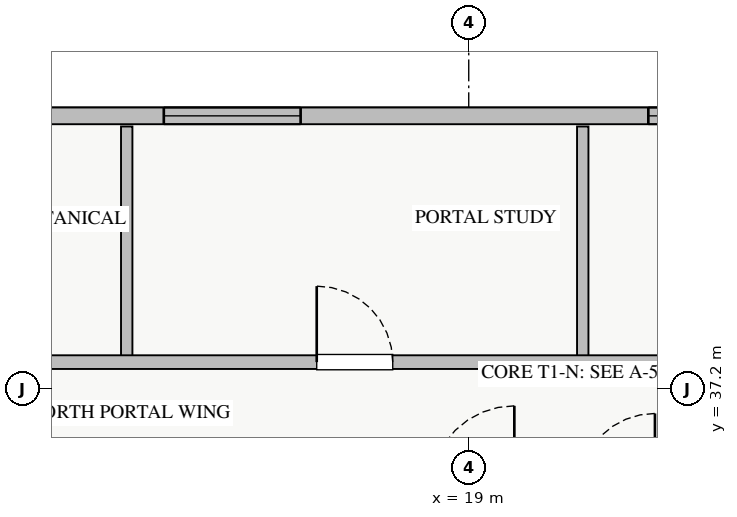
"""IFC4 building model, lengths in metres.
Left out: names, types, materials, properties, quantities, classifications, styles, units other than length and angle.
Written with IfcOpenShell. Run it as: python <this file> out.ifc"""

import sys

from ifc_helpers import new_model, si_unit, direction, frame, frame_2d, origin, place, context, subcontext, project, spatial, rectangle, extrude, source, transform, mapped, element, fill, save


model = new_model("IFC4")
c1 = context("Model", 3, precision=1e-05, world=origin(), true_north=direction((0.0, 1.0)))
c2 = subcontext(c1, "Body", "Model", "MODEL_VIEW")
j1 = project(units=[si_unit("LENGTHUNIT", "METRE"), si_unit("PLANEANGLEUNIT", "RADIAN")], contexts=[c1])
p1 = place(None, origin())
s1 = spatial("IfcSite", under=j1, at=p1, CompositionType="ELEMENT")
p2 = place(p1, origin())
s2 = spatial("IfcBuilding", under=s1, at=p2, CompositionType="ELEMENT")
p3 = place(p2, frame((0.0, 0.0, 169.75)))
s3 = spatial("IfcBuildingStorey", under=s2, at=p3, CompositionType="ELEMENT", Elevation=169.75)
p4 = place(p3, frame((6.55, 40.79, 0.0), z_axis=(0.0, 0.0, 1.0), x_axis=(1.0, 0.0, 0.0)))
e1 = element("IfcWall", 1, at=p4, inside=s3, PredefinedType="STANDARD", context=c2, shape_type="SweptSolid", body=[
    extrude(rectangle(XDim=24.9, YDim=0.22, at=frame_2d((12.45, 0.0))), origin(), (0.0, 0.0, 1.0), 2.54),
])
p5 = place(p4, frame((3.833, 0.0, 0.9)))
e2 = element("IfcOpeningElement", 2, at=p5, cuts=e1, PredefinedType="OPENING", context=c2, shape_type="SweptSolid", body=[
    extrude(rectangle(XDim=2.4, YDim=1.5, at=frame_2d((1.2, 0.75))), frame((0.0, 0.12, 0.0), z_axis=(0.0, -1.0, 0.0), x_axis=(1.0, 0.0, 0.0)), (0.0, 0.0, 1.0), 0.24),
])
p6 = place(p4, frame((8.438, 0.0, 0.9)))
e3 = element("IfcOpeningElement", 3, at=p6, cuts=e1, PredefinedType="OPENING", context=c2, shape_type="SweptSolid", body=[
    extrude(rectangle(XDim=1.8, YDim=1.45, at=frame_2d((0.9, 0.725))), frame((0.0, 0.12, 0.0), z_axis=(0.0, -1.0, 0.0), x_axis=(1.0, 0.0, 0.0)), (0.0, 0.0, 1.0), 0.24),
])
p7 = place(p4, frame((14.813, 0.0, 0.9)))
e4 = element("IfcOpeningElement", 4, at=p7, cuts=e1, PredefinedType="OPENING", context=c2, shape_type="SweptSolid", body=[
    extrude(rectangle(XDim=1.5, YDim=1.45, at=frame_2d((0.75, 0.725))), frame((0.0, 0.12, 0.0), z_axis=(0.0, -1.0, 0.0), x_axis=(1.0, 0.0, 0.0)), (0.0, 0.0, 1.0), 0.24),
])
p8 = place(p4, frame((20.738, 0.0, 0.9)))
e5 = element("IfcOpeningElement", 5, at=p8, cuts=e1, PredefinedType="OPENING", context=c2, shape_type="SweptSolid", body=[
    extrude(rectangle(XDim=2.1, YDim=1.46, at=frame_2d((1.05, 0.73))), frame((0.0, 0.12, 0.0), z_axis=(0.0, -1.0, 0.0), x_axis=(1.0, 0.0, 0.0)), (0.0, 0.0, 1.0), 0.24),
])
for number, where, z_axis, x_axis in (
    (6, (14.5, 37.55, 0.0), (0.0, 0.0, 1.0), (0.0, 1.0, 0.0)),
    (7, (20.5, 37.55, 0.0), (0.0, 0.0, 1.0), (0.0, 1.0, 0.0)),
):
    element("IfcWall", number, at=place(p3, frame(where, z_axis=z_axis, x_axis=x_axis)), inside=s3, PredefinedType="PARTITIONING", context=c2, shape_type="SweptSolid", body=[
        extrude(rectangle(XDim=3.1, YDim=0.15, at=frame_2d((1.55, 0.0))), origin(), (0.0, 0.0, 1.0), 3.0),
    ])
p9 = place(p3, frame((8.65, 37.55, 0.0), z_axis=(0.0, 0.0, 1.0), x_axis=(1.0, 0.0, 0.0)))
e8 = element("IfcWall", 8, at=p9, inside=s3, PredefinedType="PARTITIONING", context=c2, shape_type="SweptSolid", body=[
    extrude(rectangle(XDim=23.8, YDim=0.18, at=frame_2d((11.9, 0.0))), origin(), (0.0, 0.0, 1.0), 3.0),
])
p10 = place(p9, frame((2.425, 0.0, 0.0)))
e9 = element("IfcOpeningElement", 9, at=p10, cuts=e8, PredefinedType="OPENING", context=c2, shape_type="SweptSolid", body=[
    extrude(rectangle(XDim=1.0, YDim=2.05, at=frame_2d((0.5, 1.025))), frame((0.0, 0.1, 0.0), z_axis=(0.0, -1.0, 0.0), x_axis=(1.0, 0.0, 0.0)), (0.0, 0.0, 1.0), 0.2),
])
p11 = place(p9, frame((8.35, 0.0, 0.0)))
e10 = element("IfcOpeningElement", 10, at=p11, cuts=e8, PredefinedType="OPENING", context=c2, shape_type="SweptSolid", body=[
    extrude(rectangle(XDim=1.0, YDim=2.05, at=frame_2d((0.5, 1.025))), frame((0.0, 0.1, 0.0), z_axis=(0.0, -1.0, 0.0), x_axis=(1.0, 0.0, 0.0)), (0.0, 0.0, 1.0), 0.2),
])
p12 = place(p9, frame((14.35, 0.0, 0.0)))
e11 = element("IfcOpeningElement", 11, at=p12, cuts=e8, PredefinedType="OPENING", context=c2, shape_type="SweptSolid", body=[
    extrude(rectangle(XDim=1.0, YDim=2.05, at=frame_2d((0.5, 1.025))), frame((0.0, 0.1, 0.0), z_axis=(0.0, -1.0, 0.0), x_axis=(1.0, 0.0, 0.0)), (0.0, 0.0, 1.0), 0.2),
])
p13 = place(p9, frame((20.325, 0.0, 0.0)))
e12 = element("IfcOpeningElement", 12, at=p13, cuts=e8, PredefinedType="OPENING", context=c2, shape_type="SweptSolid", body=[
    extrude(rectangle(XDim=1.0, YDim=2.05, at=frame_2d((0.5, 1.025))), frame((0.0, 0.1, 0.0), z_axis=(0.0, -1.0, 0.0), x_axis=(1.0, 0.0, 0.0)), (0.0, 0.0, 1.0), 0.2),
])
m1 = source(origin(), c2, "Body", "SweptSolid", [
    extrude(rectangle(XDim=1.8, YDim=1.45, at=frame_2d((0.9, 0.725))), frame((0.0, 0.03, 0.0), z_axis=(0.0, -1.0, 0.0), x_axis=(1.0, 0.0, 0.0)), (0.0, 0.0, 1.0), 0.06),
])
p14 = place(p6, origin())
e13 = element("IfcWindow", 13, at=p14, inside=s3, PartitioningType="DOUBLE_PANEL_VERTICAL", PredefinedType="WINDOW", context=c2, shape_type="MappedRepresentation", body=[
    mapped(m1, transform((0.0, 0.0, 0.0), x_axis=(1.0, 0.0, 0.0), y_axis=(0.0, 1.0, 0.0), z_axis=(0.0, 0.0, 1.0), scale=1.0)),
])
fill(e3, e13)
m2 = source(origin(), c2, "Body", "SweptSolid", [
    extrude(rectangle(XDim=1.5, YDim=1.45, at=frame_2d((0.75, 0.725))), frame((0.0, 0.03, 0.0), z_axis=(0.0, -1.0, 0.0), x_axis=(1.0, 0.0, 0.0)), (0.0, 0.0, 1.0), 0.06),
])
p15 = place(p7, origin())
e14 = element("IfcWindow", 14, at=p15, inside=s3, PartitioningType="DOUBLE_PANEL_VERTICAL", PredefinedType="WINDOW", context=c2, shape_type="MappedRepresentation", body=[
    mapped(m2, transform((0.0, 0.0, 0.0), x_axis=(1.0, 0.0, 0.0), y_axis=(0.0, 1.0, 0.0), z_axis=(0.0, 0.0, 1.0), scale=1.0)),
])
fill(e4, e14)
m3 = source(origin(), c2, "Body", "SweptSolid", [
    extrude(rectangle(XDim=1.0, YDim=2.05, at=frame_2d((0.5, 1.025))), frame((0.0, 0.025, 0.0), z_axis=(0.0, -1.0, 0.0), x_axis=(1.0, 0.0, 0.0)), (0.0, 0.0, 1.0), 0.05),
])
p16 = place(p11, origin())
e15 = element("IfcDoor", 15, at=p16, inside=s3, OperationType="SINGLE_SWING_LEFT", PredefinedType="DOOR", context=c2, shape_type="MappedRepresentation", body=[
    mapped(m3, transform((0.0, 0.0, 0.0), x_axis=(1.0, 0.0, 0.0), y_axis=(0.0, 1.0, 0.0), z_axis=(0.0, 0.0, 1.0), scale=1.0)),
])
fill(e10, e15)
save(model, sys.argv[1])
